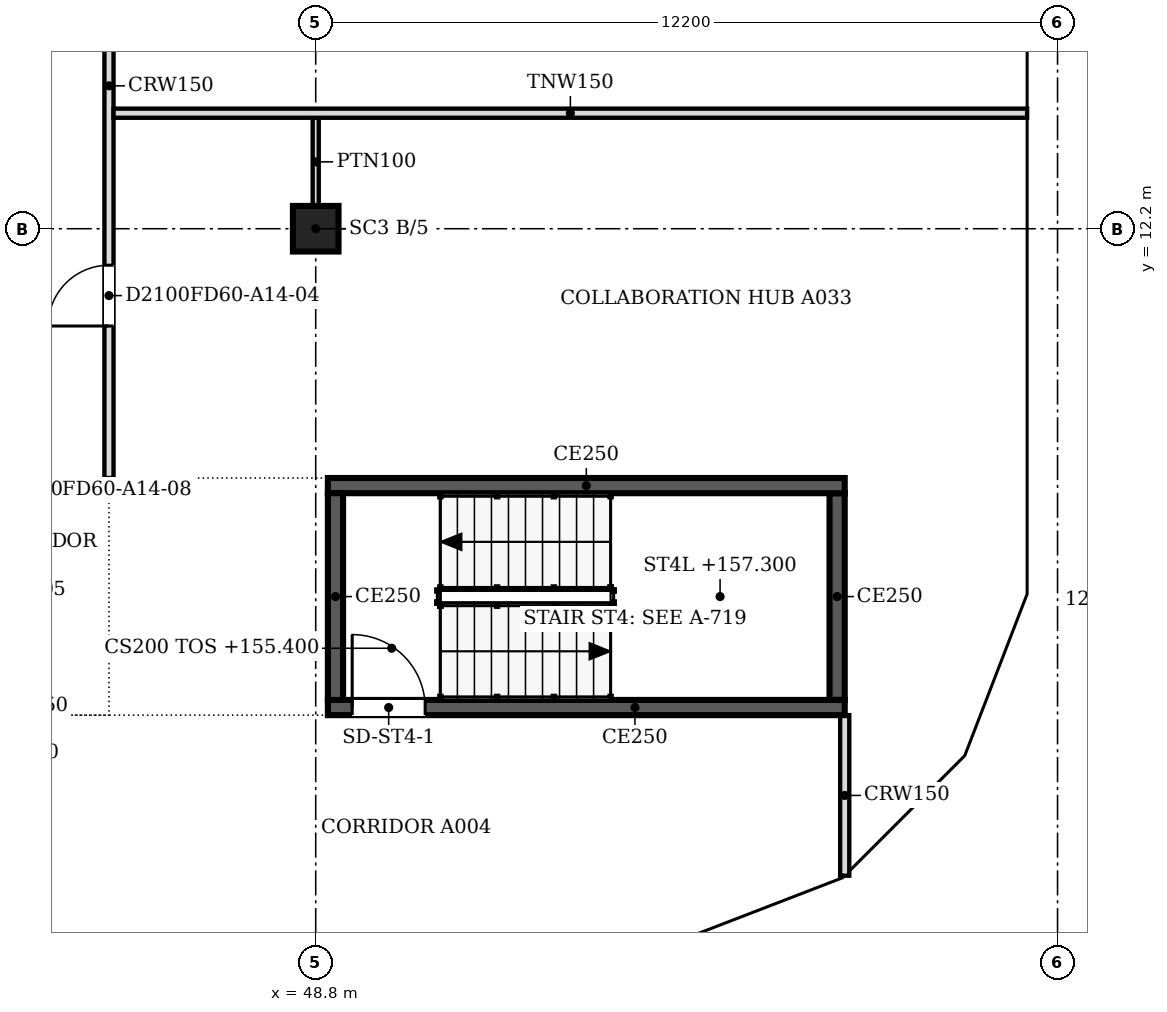
"""IFC4 building model, lengths in metres.
Left out: names, types, materials, properties, quantities, classifications, styles, units other than length and angle.
Written with IfcOpenShell. Run it as: python <this file> out.ifc"""

import sys

from ifc_helpers import new_model, si_unit, direction, frame, frame_2d, origin, origin_2d, place, context, subcontext, project, spatial, polyline, rectangle, outline, extrude, faceted_brep, source, transform, mapped, element, fill, save


model = new_model("IFC4")
c1 = context("Model", 3, precision=1e-05, world=origin(), true_north=direction((0.0, 1.0)))
c2 = subcontext(c1, "Body", "Model", "MODEL_VIEW")
j1 = project(units=[si_unit("LENGTHUNIT", "METRE"), si_unit("PLANEANGLEUNIT", "RADIAN")], contexts=[c1])
p1 = place(None, origin())
s1 = spatial("IfcSite", under=j1, at=p1, CompositionType="ELEMENT")
p2 = place(p1, origin())
s2 = spatial("IfcBuilding", under=s1, at=p2, CompositionType="ELEMENT")
p3 = place(p2, frame((0.0, 0.0, 155.4)))
s3 = spatial("IfcBuildingStorey", under=s2, at=p3, CompositionType="ELEMENT", Elevation=155.4)
p4 = place(p3, frame((48.8, 12.2, 0.0), z_axis=(0.0, 0.0, 1.0), x_axis=(1.0, 0.0, 0.0)))
e1 = element("IfcColumn", 1, at=p4, inside=s3, PredefinedType="COLUMN", context=c2, shape_type="SweptSolid", body=[
    extrude(rectangle(XDim=0.75, YDim=0.75, at=origin_2d()), origin(), (0.0, 0.0, 1.0), 3.6),
])
m1 = source(origin(), c2, "Body", "Brep", [
    faceted_brep([(2.997, -0.25, 0.0), (0.047, -0.25, 3.8), (0.0, -0.25, 3.741), (0.0, -0.25, 0.0), (0.093, 0.25, 3.74), (2.944, 0.25, 0.068), (2.944, 0.25, 0.0), (0.093, 0.25, 0.0), (0.047, 0.0, 3.8), (2.997, 0.0, 0.0)], [[[0, 1, 2, 3]], [[4, 5, 6, 7]], [[5, 4, 8, 1, 0, 9]], [[2, 1, 8]], [[7, 6, 9, 0, 3]], [[7, 3, 2, 8, 4]], [[9, 6, 5]]]),
])
p5 = place(p3, frame((54.81, 0.233, 0.0), z_axis=(0.0, 0.0, 1.0), x_axis=(0.932990326376, 0.359901446078, 0.0)))
e2 = element("IfcWall", 2, at=p5, inside=s3, PredefinedType="SOLIDWALL", context=c2, shape_type="MappedRepresentation", body=[
    mapped(m1, transform((0.0, 0.0, 0.0), scale=1.0)),
])
m2 = source(origin(), c2, "Body", "SweptSolid", [
    extrude(outline(polyline([(2.487, 0.25), (0.247, 3.135), (0.247, 0.25), (2.487, 0.25)])), frame((0.0, 0.26, 0.0), z_axis=(0.0, -1.0, 0.0), x_axis=(1.0, 0.0, 0.0)), (0.0, 0.0, 1.0), 0.52),
])
p6 = place(p5, origin())
e3 = element("IfcOpeningElement", 3, at=p6, cuts=e2, PredefinedType="OPENING", context=c2, shape_type="MappedRepresentation", body=[
    mapped(m2, transform((0.0, 0.0, 0.0), scale=1.0)),
])
m3 = source(origin(), c2, "Body", "Brep", [
    faceted_brep([(2.997, -0.25, 3.732), (2.944, -0.25, 3.8), (0.0, -0.25, 0.0), (2.997, -0.25, 0.0), (0.053, 0.25, 0.068), (2.891, 0.25, 3.732), (2.891, 0.25, 0.0), (0.053, 0.25, 0.0), (2.944, 0.0, 3.8), (0.0, 0.0, 0.0)], [[[0, 1, 2, 3]], [[4, 5, 6, 7]], [[8, 1, 0]], [[5, 4, 9, 2, 1, 8]], [[7, 6, 3, 2, 9]], [[7, 9, 4]], [[3, 6, 5, 8, 0]]]),
])
p7 = place(p3, frame((57.606, 1.312, 0.0), z_axis=(0.0, 0.0, 1.0), x_axis=(0.707147509625, 0.707066050402, 0.0)))
e4 = element("IfcWall", 4, at=p7, inside=s3, PredefinedType="SOLIDWALL", context=c2, shape_type="MappedRepresentation", body=[
    mapped(m3, transform((0.0, 0.0, 0.0), scale=1.0)),
])
m4 = source(origin(), c2, "Body", "SweptSolid", [
    extrude(outline(polyline([(2.744, 3.134), (0.51, 0.25), (2.744, 0.25), (2.744, 3.134)])), frame((0.0, 0.26, 0.0), z_axis=(0.0, -1.0, 0.0), x_axis=(1.0, 0.0, 0.0)), (0.0, 0.0, 1.0), 0.52),
])
p8 = place(p7, origin())
e5 = element("IfcOpeningElement", 5, at=p8, cuts=e4, PredefinedType="OPENING", context=c2, shape_type="MappedRepresentation", body=[
    mapped(m4, transform((0.0, 0.0, 0.0), scale=1.0)),
])
m5 = source(origin(), c2, "Body", "Brep", [
    faceted_brep([(3.003, -0.25, 0.0), (0.053, -0.25, 3.8), (0.0, -0.25, 3.732), (0.0, -0.25, 0.0), (0.106, 0.25, 3.732), (2.957, 0.25, 0.06), (2.957, 0.25, 0.0), (0.106, 0.25, 0.0), (0.053, 0.0, 3.8), (3.003, 0.0, 0.0)], [[[0, 1, 2, 3]], [[4, 5, 6, 7]], [[5, 4, 8, 1, 0, 9]], [[2, 1, 8]], [[7, 6, 9, 0, 3]], [[7, 3, 2, 8, 4]], [[9, 6, 5]]]),
])
p9 = place(p3, frame((59.669, 3.344, 0.0), z_axis=(0.0, 0.0, 1.0), x_axis=(0.35992665181, 0.932980602862, 0.0)))
e6 = element("IfcWall", 6, at=p9, inside=s3, PredefinedType="SOLIDWALL", context=c2, shape_type="MappedRepresentation", body=[
    mapped(m5, transform((0.0, 0.0, 0.0), scale=1.0)),
])
m6 = source(origin(), c2, "Body", "SweptSolid", [
    extrude(outline(polyline([(2.493, 0.25), (0.253, 3.135), (0.253, 0.25), (2.493, 0.25)])), frame((0.0, 0.26, 0.0), z_axis=(0.0, -1.0, 0.0), x_axis=(1.0, 0.0, 0.0)), (0.0, 0.0, 1.0), 0.52),
])
p10 = place(p9, origin())
e7 = element("IfcOpeningElement", 7, at=p10, cuts=e6, PredefinedType="OPENING", context=c2, shape_type="MappedRepresentation", body=[
    mapped(m6, transform((0.0, 0.0, 0.0), scale=1.0)),
])
m7 = source(origin(), c2, "Body", "Brep", [
    faceted_brep([(6.053, -0.25, 0.0), (3.003, -0.25, 3.8), (0.0, -0.25, 0.0), (0.047, 0.25, 0.059), (3.003, 0.25, 3.8), (6.053, 0.25, 0.0), (0.047, 0.25, 0.0), (0.0, 0.0, 0.0)], [[[0, 1, 2]], [[3, 4, 5, 6]], [[5, 4, 1, 0]], [[4, 3, 7, 2, 1]], [[6, 5, 0, 2, 7]], [[6, 7, 3]]]),
])
p11 = place(p3, frame((60.75, 6.146, 0.0), z_axis=(0.0, 0.0, 1.0), x_axis=(0.0, 1.0, 0.0)))
e8 = element("IfcWall", 8, at=p11, inside=s3, PredefinedType="SOLIDWALL", context=c2, shape_type="MappedRepresentation", body=[
    mapped(m7, transform((0.0, 0.0, 0.0), scale=1.0)),
])
m8 = source(origin(), c2, "Body", "SweptSolid", [
    extrude(outline(polyline([(5.532, 0.25), (3.005, 3.399), (0.516, 0.25), (5.532, 0.25)])), frame((0.0, 0.26, 0.0), z_axis=(0.0, -1.0, 0.0), x_axis=(1.0, 0.0, 0.0)), (0.0, 0.0, 1.0), 0.52),
])
p12 = place(p11, origin())
e9 = element("IfcOpeningElement", 9, at=p12, cuts=e8, PredefinedType="OPENING", context=c2, shape_type="MappedRepresentation", body=[
    mapped(m8, transform((0.0, 0.0, 0.0), scale=1.0)),
])
m9 = source(origin(), c2, "Body", "SweptSolid", [
    extrude(outline(polyline([(6.1, 0.0), (3.05, 3.8), (0.0, 0.0), (6.1, 0.0)])), frame((0.0, 0.25, 0.0), z_axis=(0.0, -1.0, 0.0), x_axis=(1.0, 0.0, 0.0)), (0.0, 0.0, 1.0), 0.5),
])
p13 = place(p3, frame((60.75, 12.2, 0.0), z_axis=(0.0, 0.0, 1.0), x_axis=(0.0, 1.0, 0.0)))
e10 = element("IfcWall", 10, at=p13, inside=s3, PredefinedType="SOLIDWALL", context=c2, shape_type="MappedRepresentation", body=[
    mapped(m9, transform((0.0, 0.0, 0.0), scale=1.0)),
])
m10 = source(origin(), c2, "Body", "SweptSolid", [
    extrude(outline(polyline([(5.579, 0.25), (3.05, 3.401), (0.521, 0.25), (5.579, 0.25)])), frame((0.0, 0.26, 0.0), z_axis=(0.0, -1.0, 0.0), x_axis=(1.0, 0.0, 0.0)), (0.0, 0.0, 1.0), 0.52),
])
p14 = place(p13, origin())
e11 = element("IfcOpeningElement", 11, at=p14, cuts=e10, PredefinedType="OPENING", context=c2, shape_type="MappedRepresentation", body=[
    mapped(m10, transform((0.0, 0.0, 0.0), scale=1.0)),
])
p15 = place(p2, frame((0.0, 0.0, 159.2)))
s4 = spatial("IfcBuildingStorey", under=s2, at=p15, CompositionType="ELEMENT", Elevation=159.2)
m11 = source(origin(), c2, "Body", "Brep", [
    faceted_brep([(2.95, -0.25, 0.0), (3.003, -0.25, 0.068), (3.003, -0.25, 7.532), (2.95, -0.25, 7.6), (0.0, -0.25, 3.8), (0.047, 0.25, 3.86), (2.898, 0.25, 7.532), (2.898, 0.25, 0.068), (0.047, 0.25, 3.74), (2.95, 0.0, 0.0), (2.95, 0.0, 7.6), (0.0, 0.0, 3.8)], [[[0, 1, 2, 3, 4]], [[5, 6, 7, 8]], [[1, 0, 9]], [[10, 3, 2]], [[6, 5, 11, 4, 3, 10]], [[8, 7, 9, 0, 4, 11]], [[8, 11, 5]], [[1, 9, 7, 6, 10, 2]]]),
])
p16 = place(p15, frame((54.854, 0.25, -3.8), z_axis=(0.0, 0.0, 1.0), x_axis=(0.932970071518, 0.359953949349, 0.0)))
e12 = element("IfcWall", 12, at=p16, inside=s4, PredefinedType="SOLIDWALL", context=c2, shape_type="MappedRepresentation", body=[
    mapped(m11, transform((0.0, 0.0, 0.0), scale=1.0)),
])
m12 = source(origin(), c2, "Body", "SweptSolid", [
    extrude(outline(polyline([(2.75, 6.935), (0.316, 3.8), (2.75, 0.665), (2.75, 6.935)])), frame((0.0, 0.26, 0.0), z_axis=(0.0, -1.0, 0.0), x_axis=(1.0, 0.0, 0.0)), (0.0, 0.0, 1.0), 0.52),
])
p17 = place(p16, origin())
e13 = element("IfcOpeningElement", 13, at=p17, cuts=e12, PredefinedType="OPENING", context=c2, shape_type="MappedRepresentation", body=[
    mapped(m12, transform((0.0, 0.0, 0.0), scale=1.0)),
])
m13 = source(origin(), c2, "Body", "Brep", [
    faceted_brep([(0.053, -0.25, 0.0), (2.997, -0.25, 3.8), (0.053, -0.25, 7.6), (0.0, -0.25, 7.532), (0.0, -0.25, 0.068), (0.106, 0.25, 7.532), (2.944, 0.25, 3.868), (2.944, 0.25, 3.732), (0.106, 0.25, 0.068), (2.997, 0.0, 3.8), (0.053, 0.0, 0.0), (0.053, 0.0, 7.6)], [[[0, 1, 2, 3, 4]], [[5, 6, 7, 8]], [[8, 7, 9, 1, 0, 10]], [[6, 5, 11, 2, 1, 9]], [[3, 2, 11]], [[10, 0, 4]], [[8, 10, 4, 3, 11, 5]], [[9, 7, 6]]]),
])
p18 = place(p15, frame((57.569, 1.274, -3.8), z_axis=(0.0, 0.0, 1.0), x_axis=(0.707066050402, 0.707147509625, 0.0)))
e14 = element("IfcWall", 14, at=p18, inside=s4, PredefinedType="SOLIDWALL", context=c2, shape_type="MappedRepresentation", body=[
    mapped(m13, transform((0.0, 0.0, 0.0), scale=1.0)),
])
m14 = source(origin(), c2, "Body", "SweptSolid", [
    extrude(outline(polyline([(0.253, 0.667), (2.681, 3.8), (0.253, 6.934), (0.253, 0.667)])), frame((0.0, 0.26, 0.0), z_axis=(0.0, -1.0, 0.0), x_axis=(1.0, 0.0, 0.0)), (0.0, 0.0, 1.0), 0.52),
])
p19 = place(p18, origin())
e15 = element("IfcOpeningElement", 15, at=p19, cuts=e14, PredefinedType="OPENING", context=c2, shape_type="MappedRepresentation", body=[
    mapped(m14, transform((0.0, 0.0, 0.0), scale=1.0)),
])
m15 = source(origin(), c2, "Body", "Brep", [
    faceted_brep([(2.95, -0.25, 0.0), (2.997, -0.25, 0.059), (2.997, -0.25, 7.541), (2.95, -0.25, 7.6), (0.0, -0.25, 3.8), (0.053, 0.25, 3.868), (2.904, 0.25, 7.54), (2.904, 0.25, 0.06), (0.053, 0.25, 3.732), (2.95, 0.0, 0.0), (2.95, 0.0, 7.6), (0.0, 0.0, 3.8)], [[[0, 1, 2, 3, 4]], [[5, 6, 7, 8]], [[1, 0, 9]], [[10, 3, 2]], [[6, 5, 11, 4, 3, 10]], [[8, 7, 9, 0, 4, 11]], [[8, 11, 5]], [[1, 9, 7, 6, 10, 2]]]),
])
p20 = place(p15, frame((59.688, 3.394, -3.8), z_axis=(0.0, 0.0, 1.0), x_axis=(0.359972353723, 0.932962970624, 0.0)))
e16 = element("IfcWall", 16, at=p20, inside=s4, PredefinedType="SOLIDWALL", context=c2, shape_type="MappedRepresentation", body=[
    mapped(m15, transform((0.0, 0.0, 0.0), scale=1.0)),
])
p21 = place(p20, origin())
e17 = element("IfcOpeningElement", 17, at=p21, cuts=e16, PredefinedType="OPENING", context=c2, shape_type="MappedRepresentation", body=[
    mapped(m12, transform((0.0, 0.0, 0.0), scale=1.0)),
])
m16 = source(origin(), c2, "Body", "Brep", [
    faceted_brep([(0.047, -0.25, 0.0), (3.05, -0.25, 3.8), (0.047, -0.25, 7.6), (0.0, -0.25, 7.54), (0.0, -0.25, 0.06), (0.093, 0.25, 7.541), (3.05, 0.25, 3.8), (0.093, 0.25, 0.059), (0.047, 0.0, 0.0), (0.047, 0.0, 7.6)], [[[0, 1, 2, 3, 4]], [[5, 6, 7]], [[7, 6, 1, 0, 8]], [[6, 5, 9, 2, 1]], [[3, 2, 9]], [[8, 0, 4]], [[7, 8, 4, 3, 9, 5]]]),
])
p22 = place(p15, frame((60.75, 6.1, -3.8), z_axis=(0.0, 0.0, 1.0), x_axis=(0.0, 1.0, 0.0)))
e18 = element("IfcWall", 18, at=p22, inside=s4, PredefinedType="SOLIDWALL", context=c2, shape_type="MappedRepresentation", body=[
    mapped(m16, transform((0.0, 0.0, 0.0), scale=1.0)),
])
m17 = source(origin(), c2, "Body", "SweptSolid", [
    extrude(outline(polyline([(0.247, 0.656), (2.731, 3.8), (0.247, 6.944), (0.247, 0.656)])), frame((0.0, 0.26, 0.0), z_axis=(0.0, -1.0, 0.0), x_axis=(1.0, 0.0, 0.0)), (0.0, 0.0, 1.0), 0.52),
])
p23 = place(p22, origin())
e19 = element("IfcOpeningElement", 19, at=p23, cuts=e18, PredefinedType="OPENING", context=c2, shape_type="MappedRepresentation", body=[
    mapped(m17, transform((0.0, 0.0, 0.0), scale=1.0)),
])
m18 = source(origin(), c2, "Body", "SweptSolid", [
    extrude(outline(polyline([(3.05, 0.0), (6.1, 3.8), (3.05, 7.6), (0.0, 3.8), (3.05, 0.0)])), frame((0.0, 0.25, 0.0), z_axis=(0.0, -1.0, 0.0), x_axis=(1.0, 0.0, 0.0)), (0.0, 0.0, 1.0), 0.5),
])
p24 = place(p15, frame((60.75, 9.15, -3.8), z_axis=(0.0, 0.0, 1.0), x_axis=(0.0, 1.0, 0.0)))
e20 = element("IfcWall", 20, at=p24, inside=s4, PredefinedType="SOLIDWALL", context=c2, shape_type="MappedRepresentation", body=[
    mapped(m18, transform((0.0, 0.0, 0.0), scale=1.0)),
])
m19 = source(origin(), c2, "Body", "SweptSolid", [
    extrude(outline(polyline([(3.05, 0.399), (5.78, 3.8), (3.05, 7.201), (0.321, 3.8), (3.05, 0.399)])), frame((0.0, 0.26, 0.0), z_axis=(0.0, -1.0, 0.0), x_axis=(1.0, 0.0, 0.0)), (0.0, 0.0, 1.0), 0.52),
])
p25 = place(p24, origin())
e21 = element("IfcOpeningElement", 21, at=p25, cuts=e20, PredefinedType="OPENING", context=c2, shape_type="MappedRepresentation", body=[
    mapped(m19, transform((0.0, 0.0, 0.0), scale=1.0)),
])
p26 = place(p3, frame((57.5, 4.325, 0.0), z_axis=(0.0, 0.0, 1.0), x_axis=(-1.0, 0.0, 0.0)))
e22 = element("IfcWall", 22, at=p26, inside=s3, PredefinedType="SOLIDWALL", context=c2, shape_type="SweptSolid", body=[
    extrude(rectangle(XDim=8.5, YDim=0.25, at=frame_2d((4.25, 0.0))), origin(), (0.0, 0.0, 1.0), 3.8),
])
m20 = source(origin(), c2, "Body", "SweptSolid", [
    extrude(rectangle(XDim=1.2, YDim=2.1, at=frame_2d((0.6, 1.05))), frame((0.0, 0.135, 0.0), z_axis=(0.0, -1.0, 0.0), x_axis=(1.0, 0.0, 0.0)), (0.0, 0.0, 1.0), 0.27),
])
p27 = place(p26, frame((6.9, 0.0, 0.0)))
e23 = element("IfcOpeningElement", 23, at=p27, cuts=e22, PredefinedType="OPENING", context=c2, shape_type="MappedRepresentation", body=[
    mapped(m20, transform((0.0, 0.0, 0.0), scale=1.0)),
])
p28 = place(p3, frame((49.125, 4.45, 0.0), z_axis=(0.0, 0.0, 1.0), x_axis=(0.0, 1.0, 0.0)))
e24 = element("IfcWall", 24, at=p28, inside=s3, PredefinedType="SOLIDWALL", context=c2, shape_type="SweptSolid", body=[
    extrude(rectangle(XDim=3.4, YDim=0.25, at=frame_2d((1.7, 0.0))), origin(), (0.0, 0.0, 1.0), 3.8),
])
p29 = place(p3, frame((49.0, 7.975, 0.0), z_axis=(0.0, 0.0, 1.0), x_axis=(1.0, 0.0, 0.0)))
e25 = element("IfcWall", 25, at=p29, inside=s3, PredefinedType="SOLIDWALL", context=c2, shape_type="SweptSolid", body=[
    extrude(rectangle(XDim=8.5, YDim=0.25, at=frame_2d((4.25, 0.0))), origin(), (0.0, 0.0, 1.0), 3.8),
])
p30 = place(p3, frame((57.375, 7.85, 0.0), z_axis=(0.0, 0.0, 1.0), x_axis=(0.0, -1.0, 0.0)))
e26 = element("IfcWall", 26, at=p30, inside=s3, PredefinedType="SOLIDWALL", context=c2, shape_type="SweptSolid", body=[
    extrude(rectangle(XDim=3.4, YDim=0.25, at=frame_2d((1.7, 0.0))), origin(), (0.0, 0.0, 1.0), 3.8),
])
p31 = place(p3, frame((57.5, 1.559, 0.0), z_axis=(0.0, 0.0, 1.0), x_axis=(0.0, 1.0, 0.0)))
e27 = element("IfcWall", 27, at=p31, inside=s3, PredefinedType="PARTITIONING", context=c2, shape_type="SweptSolid", body=[
    extrude(rectangle(XDim=2.641, YDim=0.15, at=frame_2d((1.32, 0.0))), origin(), (0.0, 0.0, 1.0), 3.067),
])
p32 = place(p3, frame((45.4, 21.924, 0.0), z_axis=(0.0, 0.0, 1.0), x_axis=(0.0, -1.0, 0.0)))
e28 = element("IfcWall", 28, at=p32, inside=s3, PredefinedType="PARTITIONING", context=c2, shape_type="SweptSolid", body=[
    extrude(rectangle(XDim=13.824, YDim=0.15, at=frame_2d((6.912, 0.0))), origin(), (0.0, 0.0, 1.0), 3.067),
])
m21 = source(origin(), c2, "Body", "SweptSolid", [
    extrude(rectangle(XDim=1.0, YDim=2.1, at=frame_2d((0.5, 1.05))), frame((0.0, 0.085, 0.0), z_axis=(0.0, -1.0, 0.0), x_axis=(1.0, 0.0, 0.0)), (0.0, 0.0, 1.0), 0.17),
])
p33 = place(p32, frame((10.324, 0.0, 0.0)))
e29 = element("IfcOpeningElement", 29, at=p33, cuts=e28, PredefinedType="OPENING", context=c2, shape_type="MappedRepresentation", body=[
    mapped(m21, transform((0.0, 0.0, 0.0), scale=1.0)),
])
p34 = place(p32, frame((3.424, 0.0, 0.0)))
e30 = element("IfcOpeningElement", 30, at=p34, cuts=e28, PredefinedType="OPENING", context=c2, shape_type="MappedRepresentation", body=[
    mapped(m21, transform((0.0, 0.0, 0.0), scale=1.0)),
])
p35 = place(p3, frame((48.8, 12.575, 0.0), z_axis=(0.0, 0.0, 1.0), x_axis=(0.0, 1.0, 0.0)))
e31 = element("IfcWall", 31, at=p35, inside=s3, PredefinedType="PARTITIONING", context=c2, shape_type="SweptSolid", body=[
    extrude(rectangle(XDim=1.45, YDim=0.1, at=frame_2d((0.725, 0.0))), origin(), (0.0, 0.0, 1.0), 3.067),
])
p36 = place(p3, frame((45.476, 14.1, 0.0), z_axis=(0.0, 0.0, 1.0), x_axis=(1.0, 0.0, 0.0)))
e32 = element("IfcWall", 32, at=p36, inside=s3, PredefinedType="PARTITIONING", context=c2, shape_type="SweptSolid", body=[
    extrude(rectangle(XDim=15.024, YDim=0.15, at=frame_2d((7.512, 0.0))), origin(), (0.0, 0.0, 1.0), 3.067),
])
m22 = source(origin(), c2, "Body", "SweptSolid", [
    extrude(rectangle(XDim=1.2, YDim=2.1, at=frame_2d((0.6, 1.05))), frame((0.0, 0.025, 0.0), z_axis=(0.0, -1.0, 0.0), x_axis=(1.0, 0.0, 0.0)), (0.0, 0.0, 1.0), 0.05),
])
p37 = place(p27, origin())
e33 = element("IfcDoor", 33, at=p37, inside=s3, OperationType="SINGLE_SWING_RIGHT", PredefinedType="DOOR", context=c2, shape_type="MappedRepresentation", body=[
    mapped(m22, transform((0.0, 0.0, 0.0), scale=1.0)),
])
fill(e23, e33)
m23 = source(origin(), c2, "Body", "SweptSolid", [
    extrude(rectangle(XDim=1.0, YDim=2.1, at=frame_2d((0.5, 1.05))), frame((0.0, 0.025, 0.0), z_axis=(0.0, -1.0, 0.0), x_axis=(1.0, 0.0, 0.0)), (0.0, 0.0, 1.0), 0.05),
])
p38 = place(p33, origin())
e34 = element("IfcDoor", 34, at=p38, inside=s3, OperationType="SINGLE_SWING_RIGHT", PredefinedType="DOOR", context=c2, shape_type="MappedRepresentation", body=[
    mapped(m23, transform((0.0, 0.0, 0.0), scale=1.0)),
])
fill(e29, e34)
save(model, sys.argv[1])
